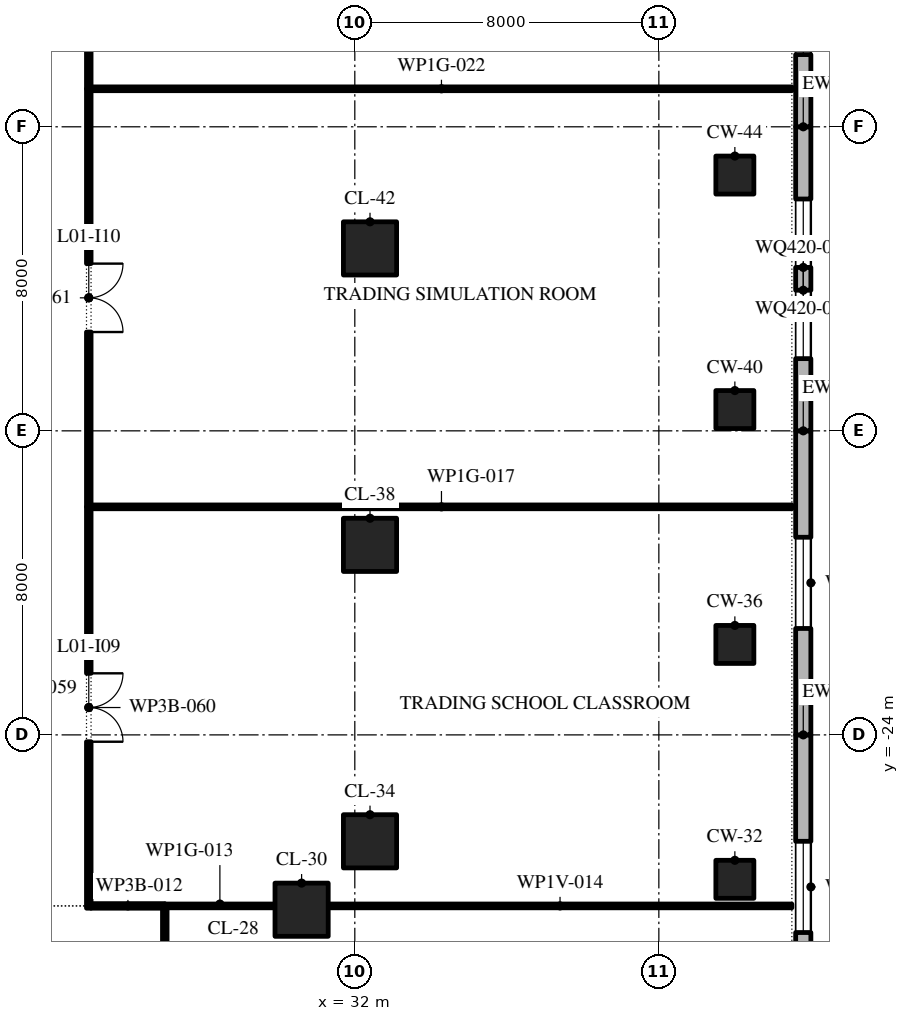
"""IFC4 building model, lengths in metres.
Left out: names, types, materials, properties, quantities, classifications, styles, units other than length and angle.
Written with IfcOpenShell. Run it as: python <this file> out.ifc"""

import sys

from ifc_helpers import new_model, si_unit, direction, frame, frame_2d, origin, origin_2d, place, context, subcontext, project, spatial, polyline, rectangle, outline, extrude, element, fill, save


model = new_model("IFC4")
c1 = context("Model", 3, precision=1e-05, world=origin(), true_north=direction((0.0, 1.0)))
c2 = subcontext(c1, "Body", "Model", "MODEL_VIEW")
j1 = project(units=[si_unit("LENGTHUNIT", "METRE"), si_unit("PLANEANGLEUNIT", "RADIAN")], contexts=[c1])
p1 = place(None, origin())
s1 = spatial("IfcSite", under=j1, at=p1, CompositionType="ELEMENT")
p2 = place(p1, origin())
s2 = spatial("IfcBuilding", under=s1, at=p2, CompositionType="ELEMENT")
p3 = place(p2, frame((0.0, 0.0, 8.0)))
s3 = spatial("IfcBuildingStorey", under=s2, at=p3, CompositionType="ELEMENT", Elevation=8.0)
p4 = place(p3, frame((30.6, -28.6, 0.0), z_axis=(0.0, 0.0, 1.0), x_axis=(1.0, 0.0, 0.0)))
e1 = element("IfcColumn", 1, at=p4, inside=s3, PredefinedType="COLUMN", context=c2, shape_type="SweptSolid", body=[
    extrude(rectangle(XDim=1.4, YDim=1.4, at=origin_2d()), origin(), (0.0, 0.0, 1.0), 6.0),
])
p5 = place(p3, frame((42.0, -27.8, 0.0), z_axis=(0.0, 0.0, 1.0), x_axis=(1.0, 0.0, 0.0)))
e2 = element("IfcColumn", 2, at=p5, inside=s3, PredefinedType="COLUMN", context=c2, shape_type="SweptSolid", body=[
    extrude(rectangle(XDim=1.0, YDim=1.0, at=origin_2d()), origin(), (0.0, 0.0, 1.0), 6.0),
])
p6 = place(p3, frame((32.4, -26.8, 0.0), z_axis=(0.0, 0.0, 1.0), x_axis=(1.0, 0.0, 0.0)))
e3 = element("IfcColumn", 3, at=p6, inside=s3, PredefinedType="COLUMN", context=c2, shape_type="SweptSolid", body=[
    extrude(rectangle(XDim=1.4, YDim=1.4, at=origin_2d()), origin(), (0.0, 0.0, 1.0), 6.0),
])
p7 = place(p3, frame((42.0, -21.62, 0.0), z_axis=(0.0, 0.0, 1.0), x_axis=(1.0, 0.0, 0.0)))
e4 = element("IfcColumn", 4, at=p7, inside=s3, PredefinedType="COLUMN", context=c2, shape_type="SweptSolid", body=[
    extrude(rectangle(XDim=1.0, YDim=1.0, at=origin_2d()), origin(), (0.0, 0.0, 1.0), 6.0),
])
p8 = place(p3, frame((32.4, -19.0, 0.0), z_axis=(0.0, 0.0, 1.0), x_axis=(1.0, 0.0, 0.0)))
e5 = element("IfcColumn", 5, at=p8, inside=s3, PredefinedType="COLUMN", context=c2, shape_type="SweptSolid", body=[
    extrude(rectangle(XDim=1.4, YDim=1.4, at=origin_2d()), origin(), (0.0, 0.0, 1.0), 6.0),
])
p9 = place(p3, frame((42.0, -15.44, 0.0), z_axis=(0.0, 0.0, 1.0), x_axis=(1.0, 0.0, 0.0)))
e6 = element("IfcColumn", 6, at=p9, inside=s3, PredefinedType="COLUMN", context=c2, shape_type="SweptSolid", body=[
    extrude(rectangle(XDim=1.0, YDim=1.0, at=origin_2d()), origin(), (0.0, 0.0, 1.0), 6.0),
])
p10 = place(p3, frame((32.4, -11.2, 0.0), z_axis=(0.0, 0.0, 1.0), x_axis=(1.0, 0.0, 0.0)))
e7 = element("IfcColumn", 7, at=p10, inside=s3, PredefinedType="COLUMN", context=c2, shape_type="SweptSolid", body=[
    extrude(rectangle(XDim=1.4, YDim=1.4, at=origin_2d()), origin(), (0.0, 0.0, 1.0), 6.0),
])
p11 = place(p3, frame((42.0, -9.27, 0.0), z_axis=(0.0, 0.0, 1.0), x_axis=(1.0, 0.0, 0.0)))
e8 = element("IfcColumn", 8, at=p11, inside=s3, PredefinedType="COLUMN", context=c2, shape_type="SweptSolid", body=[
    extrude(rectangle(XDim=1.0, YDim=1.0, at=origin_2d()), origin(), (0.0, 0.0, 1.0), 6.0),
])
p12 = place(p3, frame((43.8, -32.0, 0.0), z_axis=(0.0, 0.0, 1.0), x_axis=(0.0, 1.0, 0.0)))
e9 = element("IfcWall", 9, at=p12, inside=s3, PredefinedType="STANDARD", context=c2, shape_type="SweptSolid", body=[
    extrude(rectangle(XDim=8.0, YDim=0.4, at=frame_2d((4.0, 0.0))), origin(), (0.0, 0.0, 1.0), 5.7),
])
p13 = place(p12, frame((2.8, 0.0, 0.9)))
e10 = element("IfcOpeningElement", 10, at=p13, cuts=e9, PredefinedType="OPENING", context=c2, shape_type="SweptSolid", body=[
    extrude(outline(polyline([(0.0, 0.0), (2.4, 0.0), (2.4, 2.122), (2.379, 2.435), (2.318, 2.743), (2.217, 3.04), (2.078, 3.322), (1.904, 3.583), (1.697, 3.819), (1.461, 4.026), (1.2, 4.2), (0.939, 4.026), (0.703, 3.819), (0.496, 3.583), (0.322, 3.322), (0.183, 3.04), (0.082, 2.743), (0.021, 2.435), (0.0, 2.122), (0.0, 0.0)])), frame((0.0, 0.21, 0.0), z_axis=(0.0, -1.0, 0.0), x_axis=(1.0, 0.0, 0.0)), (0.0, 0.0, 1.0), 0.42),
])
p14 = place(p3, frame((43.8, -24.0, 0.0), z_axis=(0.0, 0.0, 1.0), x_axis=(0.0, 1.0, 0.0)))
e11 = element("IfcWall", 11, at=p14, inside=s3, PredefinedType="STANDARD", context=c2, shape_type="SweptSolid", body=[
    extrude(rectangle(XDim=8.0, YDim=0.4, at=frame_2d((4.0, 0.0))), origin(), (0.0, 0.0, 1.0), 5.7),
])
p15 = place(p14, frame((2.8, 0.0, 0.9)))
e12 = element("IfcOpeningElement", 12, at=p15, cuts=e11, PredefinedType="OPENING", context=c2, shape_type="SweptSolid", body=[
    extrude(outline(polyline([(0.0, 0.0), (2.4, 0.0), (2.4, 2.122), (2.379, 2.435), (2.318, 2.743), (2.217, 3.04), (2.078, 3.322), (1.904, 3.583), (1.697, 3.819), (1.461, 4.026), (1.2, 4.2), (0.939, 4.026), (0.703, 3.819), (0.496, 3.583), (0.322, 3.322), (0.183, 3.04), (0.082, 2.743), (0.021, 2.435), (0.0, 2.122), (0.0, 0.0)])), frame((0.0, 0.21, 0.0), z_axis=(0.0, -1.0, 0.0), x_axis=(1.0, 0.0, 0.0)), (0.0, 0.0, 1.0), 0.42),
])
p16 = place(p3, frame((43.8, -16.0, 0.0), z_axis=(0.0, 0.0, 1.0), x_axis=(0.0, 1.0, 0.0)))
e13 = element("IfcWall", 13, at=p16, inside=s3, PredefinedType="STANDARD", context=c2, shape_type="SweptSolid", body=[
    extrude(rectangle(XDim=8.0, YDim=0.4, at=frame_2d((4.0, 0.0))), origin(), (0.0, 0.0, 1.0), 5.7),
])
p17 = place(p16, frame((1.9, 0.0, 0.9)))
e14 = element("IfcOpeningElement", 14, at=p17, cuts=e13, PredefinedType="OPENING", context=c2, shape_type="SweptSolid", body=[
    extrude(outline(polyline([(0.0, 0.0), (1.8, 0.0), (1.8, 2.641), (1.785, 2.876), (1.739, 3.107), (1.663, 3.33), (1.559, 3.541), (1.428, 3.737), (1.273, 3.914), (1.096, 4.069), (0.9, 4.2), (0.704, 4.069), (0.527, 3.914), (0.372, 3.737), (0.241, 3.541), (0.137, 3.33), (0.061, 3.107), (0.015, 2.876), (0.0, 2.641), (0.0, 0.0)])), frame((0.0, 0.21, 0.0), z_axis=(0.0, -1.0, 0.0), x_axis=(1.0, 0.0, 0.0)), (0.0, 0.0, 1.0), 0.42),
])
p18 = place(p16, frame((4.3, 0.0, 0.9)))
e15 = element("IfcOpeningElement", 15, at=p18, cuts=e13, PredefinedType="OPENING", context=c2, shape_type="SweptSolid", body=[
    extrude(outline(polyline([(0.0, 0.0), (1.8, 0.0), (1.8, 2.641), (1.785, 2.876), (1.739, 3.107), (1.663, 3.33), (1.559, 3.541), (1.428, 3.737), (1.273, 3.914), (1.096, 4.069), (0.9, 4.2), (0.704, 4.069), (0.527, 3.914), (0.372, 3.737), (0.241, 3.541), (0.137, 3.33), (0.061, 3.107), (0.015, 2.876), (0.0, 2.641), (0.0, 0.0)])), frame((0.0, 0.21, 0.0), z_axis=(0.0, -1.0, 0.0), x_axis=(1.0, 0.0, 0.0)), (0.0, 0.0, 1.0), 0.42),
])
p19 = place(p3, frame((43.8, -8.0, 0.0), z_axis=(0.0, 0.0, 1.0), x_axis=(0.0, 1.0, 0.0)))
e16 = element("IfcWall", 16, at=p19, inside=s3, PredefinedType="STANDARD", context=c2, shape_type="SweptSolid", body=[
    extrude(rectangle(XDim=8.0, YDim=0.4, at=frame_2d((4.0, 0.0))), origin(), (0.0, 0.0, 1.0), 5.7),
])
p20 = place(p19, frame((1.9, 0.0, 0.9)))
e17 = element("IfcOpeningElement", 17, at=p20, cuts=e16, PredefinedType="OPENING", context=c2, shape_type="SweptSolid", body=[
    extrude(outline(polyline([(0.0, 0.0), (1.8, 0.0), (1.8, 2.641), (1.785, 2.876), (1.739, 3.107), (1.663, 3.33), (1.559, 3.541), (1.428, 3.737), (1.273, 3.914), (1.096, 4.069), (0.9, 4.2), (0.704, 4.069), (0.527, 3.914), (0.372, 3.737), (0.241, 3.541), (0.137, 3.33), (0.061, 3.107), (0.015, 2.876), (0.0, 2.641), (0.0, 0.0)])), frame((0.0, 0.21, 0.0), z_axis=(0.0, -1.0, 0.0), x_axis=(1.0, 0.0, 0.0)), (0.0, 0.0, 1.0), 0.42),
])
p21 = place(p19, frame((4.3, 0.0, 0.9)))
e18 = element("IfcOpeningElement", 18, at=p21, cuts=e16, PredefinedType="OPENING", context=c2, shape_type="SweptSolid", body=[
    extrude(outline(polyline([(0.0, 0.0), (1.8, 0.0), (1.8, 2.641), (1.785, 2.876), (1.739, 3.107), (1.663, 3.33), (1.559, 3.541), (1.428, 3.737), (1.273, 3.914), (1.096, 4.069), (0.9, 4.2), (0.704, 4.069), (0.527, 3.914), (0.372, 3.737), (0.241, 3.541), (0.137, 3.33), (0.061, 3.107), (0.015, 2.876), (0.0, 2.641), (0.0, 0.0)])), frame((0.0, 0.21, 0.0), z_axis=(0.0, -1.0, 0.0), x_axis=(1.0, 0.0, 0.0)), (0.0, 0.0, 1.0), 0.42),
])
p22 = place(p3, frame((25.06, -28.5, 0.0), z_axis=(0.0, 0.0, 1.0), x_axis=(1.0, 0.0, 0.0)))
e19 = element("IfcWall", 19, at=p22, inside=s3, PredefinedType="PARTITIONING", context=c2, shape_type="SweptSolid", body=[
    extrude(rectangle(XDim=1.94, YDim=0.12, at=frame_2d((0.97, 0.0))), origin(), (0.0, 0.0, 1.0), 5.7),
])
p23 = place(p3, frame((27.0, -28.5, 0.0), z_axis=(0.0, 0.0, 1.0), x_axis=(1.0, 0.0, 0.0)))
e20 = element("IfcWall", 20, at=p23, inside=s3, PredefinedType="PARTITIONING", context=c2, shape_type="SweptSolid", body=[
    extrude(rectangle(XDim=2.9, YDim=0.1, at=frame_2d((1.45, 0.0))), origin(), (0.0, 0.0, 1.0), 5.7),
])
p24 = place(p3, frame((31.3, -28.5, 0.0), z_axis=(0.0, 0.0, 1.0), x_axis=(1.0, 0.0, 0.0)))
e21 = element("IfcWall", 21, at=p24, inside=s3, PredefinedType="PARTITIONING", context=c2, shape_type="SweptSolid", body=[
    extrude(rectangle(XDim=12.2, YDim=0.1, at=frame_2d((6.1, 0.0))), origin(), (0.0, 0.0, 1.0), 5.164),
])
for number, where, z_axis, x_axis in (
    (22, (25.06, -18.0, 0.0), (0.0, 0.0, 1.0), (1.0, 0.0, 0.0)),
    (23, (25.06, -7.0, 0.0), (0.0, 0.0, 1.0), (1.0, 0.0, 0.0)),
):
    element("IfcWall", number, at=place(p3, frame(where, z_axis=z_axis, x_axis=x_axis)), inside=s3, PredefinedType="PARTITIONING", context=c2, shape_type="SweptSolid", body=[
        extrude(rectangle(XDim=18.44, YDim=0.1, at=frame_2d((9.22, 0.0))), origin(), (0.0, 0.0, 1.0), 5.7),
    ])
p25 = place(p3, frame((25.0, -28.56, 0.0), z_axis=(0.0, 0.0, 1.0), x_axis=(0.0, 1.0, 0.0)))
e24 = element("IfcWall", 24, at=p25, inside=s3, PredefinedType="PARTITIONING", context=c2, shape_type="SweptSolid", body=[
    extrude(rectangle(XDim=10.56, YDim=0.12, at=frame_2d((5.28, 0.0))), origin(), (0.0, 0.0, 1.0), 5.7),
])
p26 = place(p25, frame((4.38, 0.0, 0.0)))
e25 = element("IfcOpeningElement", 25, at=p26, cuts=e24, PredefinedType="OPENING", context=c2, shape_type="SweptSolid", body=[
    extrude(rectangle(XDim=1.8, YDim=2.1, at=frame_2d((0.9, 1.05))), frame((0.0, 0.07, 0.0), z_axis=(0.0, -1.0, 0.0), x_axis=(1.0, 0.0, 0.0)), (0.0, 0.0, 1.0), 0.14),
])
p27 = place(p3, frame((25.0, -18.0, 0.0), z_axis=(0.0, 0.0, 1.0), x_axis=(0.0, 1.0, 0.0)))
e26 = element("IfcWall", 26, at=p27, inside=s3, PredefinedType="PARTITIONING", context=c2, shape_type="SweptSolid", body=[
    extrude(rectangle(XDim=11.0, YDim=0.12, at=frame_2d((5.5, 0.0))), origin(), (0.0, 0.0, 1.0), 5.7),
])
p28 = place(p27, frame((4.6, 0.0, 0.0)))
e27 = element("IfcOpeningElement", 27, at=p28, cuts=e26, PredefinedType="OPENING", context=c2, shape_type="SweptSolid", body=[
    extrude(rectangle(XDim=1.8, YDim=2.1, at=frame_2d((0.9, 1.05))), frame((0.0, 0.07, 0.0), z_axis=(0.0, -1.0, 0.0), x_axis=(1.0, 0.0, 0.0)), (0.0, 0.0, 1.0), 0.14),
])
p29 = place(p3, frame((25.0, -7.0, 0.0), z_axis=(0.0, 0.0, 1.0), x_axis=(0.0, 1.0, 0.0)))
e28 = element("IfcWall", 28, at=p29, inside=s3, PredefinedType="PARTITIONING", context=c2, shape_type="SweptSolid", body=[
    extrude(rectangle(XDim=11.0, YDim=0.12, at=frame_2d((5.5, 0.0))), origin(), (0.0, 0.0, 1.0), 5.7),
])
p30 = place(p29, frame((4.6, 0.0, 0.0)))
e29 = element("IfcOpeningElement", 29, at=p30, cuts=e28, PredefinedType="OPENING", context=c2, shape_type="SweptSolid", body=[
    extrude(rectangle(XDim=1.8, YDim=2.1, at=frame_2d((0.9, 1.05))), frame((0.0, 0.07, 0.0), z_axis=(0.0, -1.0, 0.0), x_axis=(1.0, 0.0, 0.0)), (0.0, 0.0, 1.0), 0.14),
])
p31 = place(p3, frame((27.0, -32.0, 0.0), z_axis=(0.0, 0.0, 1.0), x_axis=(0.0, 1.0, 0.0)))
e30 = element("IfcWall", 30, at=p31, inside=s3, PredefinedType="PARTITIONING", context=c2, shape_type="SweptSolid", body=[
    extrude(rectangle(XDim=3.44, YDim=0.12, at=frame_2d((1.72, 0.0))), origin(), (0.0, 0.0, 1.0), 5.7),
])
p32 = place(p13, origin())
e31 = element("IfcWindow", 31, at=p32, inside=s3, PartitioningType="DOUBLE_PANEL_VERTICAL", PredefinedType="WINDOW", context=c2, shape_type="SweptSolid", body=[
    extrude(outline(polyline([(0.0, 0.0), (2.4, 0.0), (2.4, 2.122), (2.379, 2.435), (2.318, 2.743), (2.217, 3.04), (2.078, 3.322), (1.904, 3.583), (1.697, 3.819), (1.461, 4.026), (1.2, 4.2), (0.939, 4.026), (0.703, 3.819), (0.496, 3.583), (0.322, 3.322), (0.183, 3.04), (0.082, 2.743), (0.021, 2.435), (0.0, 2.122), (0.0, 0.0)])), frame((0.0, 0.03, 0.0), z_axis=(0.0, -1.0, 0.0), x_axis=(1.0, 0.0, 0.0)), (0.0, 0.0, 1.0), 0.06),
])
fill(e10, e31)
p33 = place(p15, origin())
e32 = element("IfcWindow", 32, at=p33, inside=s3, PartitioningType="DOUBLE_PANEL_VERTICAL", PredefinedType="WINDOW", context=c2, shape_type="SweptSolid", body=[
    extrude(outline(polyline([(0.0, 0.0), (2.4, 0.0), (2.4, 2.122), (2.379, 2.435), (2.318, 2.743), (2.217, 3.04), (2.078, 3.322), (1.904, 3.583), (1.697, 3.819), (1.461, 4.026), (1.2, 4.2), (0.939, 4.026), (0.703, 3.819), (0.496, 3.583), (0.322, 3.322), (0.183, 3.04), (0.082, 2.743), (0.021, 2.435), (0.0, 2.122), (0.0, 0.0)])), frame((0.0, 0.03, 0.0), z_axis=(0.0, -1.0, 0.0), x_axis=(1.0, 0.0, 0.0)), (0.0, 0.0, 1.0), 0.06),
])
fill(e12, e32)
p34 = place(p17, origin())
e33 = element("IfcWindow", 33, at=p34, inside=s3, PartitioningType="DOUBLE_PANEL_VERTICAL", PredefinedType="WINDOW", context=c2, shape_type="SweptSolid", body=[
    extrude(outline(polyline([(0.0, 0.0), (1.8, 0.0), (1.8, 2.641), (1.785, 2.876), (1.739, 3.107), (1.663, 3.33), (1.559, 3.541), (1.428, 3.737), (1.273, 3.914), (1.096, 4.069), (0.9, 4.2), (0.704, 4.069), (0.527, 3.914), (0.372, 3.737), (0.241, 3.541), (0.137, 3.33), (0.061, 3.107), (0.015, 2.876), (0.0, 2.641), (0.0, 0.0)])), frame((0.0, 0.03, 0.0), z_axis=(0.0, -1.0, 0.0), x_axis=(1.0, 0.0, 0.0)), (0.0, 0.0, 1.0), 0.06),
])
fill(e14, e33)
p35 = place(p18, origin())
e34 = element("IfcWindow", 34, at=p35, inside=s3, PartitioningType="DOUBLE_PANEL_VERTICAL", PredefinedType="WINDOW", context=c2, shape_type="SweptSolid", body=[
    extrude(outline(polyline([(0.0, 0.0), (1.8, 0.0), (1.8, 2.641), (1.785, 2.876), (1.739, 3.107), (1.663, 3.33), (1.559, 3.541), (1.428, 3.737), (1.273, 3.914), (1.096, 4.069), (0.9, 4.2), (0.704, 4.069), (0.527, 3.914), (0.372, 3.737), (0.241, 3.541), (0.137, 3.33), (0.061, 3.107), (0.015, 2.876), (0.0, 2.641), (0.0, 0.0)])), frame((0.0, 0.03, 0.0), z_axis=(0.0, -1.0, 0.0), x_axis=(1.0, 0.0, 0.0)), (0.0, 0.0, 1.0), 0.06),
])
fill(e15, e34)
p36 = place(p20, origin())
e35 = element("IfcWindow", 35, at=p36, inside=s3, PartitioningType="DOUBLE_PANEL_VERTICAL", PredefinedType="WINDOW", context=c2, shape_type="SweptSolid", body=[
    extrude(outline(polyline([(0.0, 0.0), (1.8, 0.0), (1.8, 2.641), (1.785, 2.876), (1.739, 3.107), (1.663, 3.33), (1.559, 3.541), (1.428, 3.737), (1.273, 3.914), (1.096, 4.069), (0.9, 4.2), (0.704, 4.069), (0.527, 3.914), (0.372, 3.737), (0.241, 3.541), (0.137, 3.33), (0.061, 3.107), (0.015, 2.876), (0.0, 2.641), (0.0, 0.0)])), frame((0.0, 0.03, 0.0), z_axis=(0.0, -1.0, 0.0), x_axis=(1.0, 0.0, 0.0)), (0.0, 0.0, 1.0), 0.06),
])
fill(e17, e35)
p37 = place(p26, frame((1.8, 0.0, 0.0), z_axis=(0.0, 0.0, 1.0), x_axis=(-1.0, 0.0, 0.0)))
e36 = element("IfcDoor", 36, at=p37, inside=s3, OperationType="SINGLE_SWING_RIGHT", PredefinedType="DOOR", context=c2, shape_type="SweptSolid", body=[
    extrude(rectangle(XDim=1.8, YDim=2.1, at=frame_2d((0.9, 1.05))), frame((0.0, 0.025, 0.0), z_axis=(0.0, -1.0, 0.0), x_axis=(1.0, 0.0, 0.0)), (0.0, 0.0, 1.0), 0.05),
])
fill(e25, e36)
p38 = place(p28, frame((1.8, 0.0, 0.0), z_axis=(0.0, 0.0, 1.0), x_axis=(-1.0, 0.0, 0.0)))
e37 = element("IfcDoor", 37, at=p38, inside=s3, OperationType="SINGLE_SWING_LEFT", PredefinedType="DOOR", context=c2, shape_type="SweptSolid", body=[
    extrude(rectangle(XDim=1.8, YDim=2.1, at=frame_2d((0.9, 1.05))), frame((0.0, 0.025, 0.0), z_axis=(0.0, -1.0, 0.0), x_axis=(1.0, 0.0, 0.0)), (0.0, 0.0, 1.0), 0.05),
])
fill(e27, e37)
save(model, sys.argv[1])
